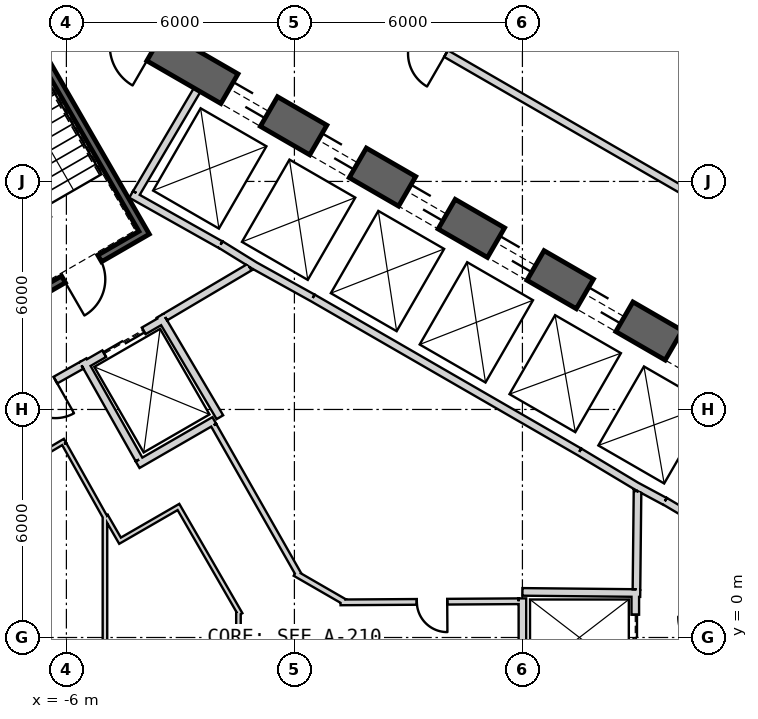
"""IFC4 building model, lengths in metres.
Left out: names, types, materials, properties, quantities, classifications, styles, units other than length and angle.
Written with IfcOpenShell. Run it as: python <this file> out.ifc"""

import sys

from ifc_helpers import new_model, si_unit, direction, frame, frame_2d, origin, place, context, subcontext, project, spatial, rectangle, extrude, element, fill, save


model = new_model("IFC4")
c1 = context("Model", 3, precision=1e-05, world=origin(), true_north=direction((0.0, 1.0)))
c2 = subcontext(c1, "Body", "Model", "MODEL_VIEW")
j1 = project(units=[si_unit("LENGTHUNIT", "METRE"), si_unit("PLANEANGLEUNIT", "RADIAN")], contexts=[c1])
p1 = place(None, origin())
s1 = spatial("IfcSite", under=j1, at=p1, CompositionType="ELEMENT")
p2 = place(p1, origin())
s2 = spatial("IfcBuilding", under=s1, at=p2, CompositionType="ELEMENT")
p3 = place(p2, frame((0.0, 0.0, 45.5)))
s3 = spatial("IfcBuildingStorey", under=s2, at=p3, CompositionType="ELEMENT", Elevation=45.5)
p4 = place(p3, frame((19.475, 2.208, 0.0), z_axis=(0.0, 0.0, 1.0), x_axis=(-0.866028369851, 0.499994862586, 0.0)))
e1 = element("IfcWall", 1, at=p4, inside=s3, PredefinedType="SHEAR", context=c2, shape_type="SweptSolid", body=[
    extrude(rectangle(XDim=31.523, YDim=0.9, at=frame_2d((15.762, 0.0))), origin(), (0.0, 0.0, 1.0), 4.1),
])
p5 = place(p4, frame((7.062, 0.0, 0.0)))
e2 = element("IfcOpeningElement", 2, at=p5, cuts=e1, PredefinedType="OPENING", context=c2, shape_type="SweptSolid", body=[
    extrude(rectangle(XDim=1.2, YDim=2.4, at=frame_2d((0.6, 1.2))), frame((0.0, 0.46, 0.0), z_axis=(0.0, -1.0, 0.0), x_axis=(1.0, 0.0, 0.0)), (0.0, 0.0, 1.0), 0.92),
])
p6 = place(p4, frame((9.762, 0.0, 0.0)))
e3 = element("IfcOpeningElement", 3, at=p6, cuts=e1, PredefinedType="OPENING", context=c2, shape_type="SweptSolid", body=[
    extrude(rectangle(XDim=1.2, YDim=2.4, at=frame_2d((0.6, 1.2))), frame((0.0, 0.46, 0.0), z_axis=(0.0, -1.0, 0.0), x_axis=(1.0, 0.0, 0.0)), (0.0, 0.0, 1.0), 0.92),
])
p7 = place(p4, frame((12.462, 0.0, 0.0)))
e4 = element("IfcOpeningElement", 4, at=p7, cuts=e1, PredefinedType="OPENING", context=c2, shape_type="SweptSolid", body=[
    extrude(rectangle(XDim=1.2, YDim=2.4, at=frame_2d((0.6, 1.2))), frame((0.0, 0.46, 0.0), z_axis=(0.0, -1.0, 0.0), x_axis=(1.0, 0.0, 0.0)), (0.0, 0.0, 1.0), 0.92),
])
p8 = place(p4, frame((15.162, 0.0, 0.0)))
e5 = element("IfcOpeningElement", 5, at=p8, cuts=e1, PredefinedType="OPENING", context=c2, shape_type="SweptSolid", body=[
    extrude(rectangle(XDim=1.2, YDim=2.4, at=frame_2d((0.6, 1.2))), frame((0.0, 0.46, 0.0), z_axis=(0.0, -1.0, 0.0), x_axis=(1.0, 0.0, 0.0)), (0.0, 0.0, 1.0), 0.92),
])
p9 = place(p4, frame((17.862, 0.0, 0.0)))
e6 = element("IfcOpeningElement", 6, at=p9, cuts=e1, PredefinedType="OPENING", context=c2, shape_type="SweptSolid", body=[
    extrude(rectangle(XDim=1.2, YDim=2.4, at=frame_2d((0.6, 1.2))), frame((0.0, 0.46, 0.0), z_axis=(0.0, -1.0, 0.0), x_axis=(1.0, 0.0, 0.0)), (0.0, 0.0, 1.0), 0.92),
])
p10 = place(p4, frame((20.562, 0.0, 0.0)))
e7 = element("IfcOpeningElement", 7, at=p10, cuts=e1, PredefinedType="OPENING", context=c2, shape_type="SweptSolid", body=[
    extrude(rectangle(XDim=1.2, YDim=2.4, at=frame_2d((0.6, 1.2))), frame((0.0, 0.46, 0.0), z_axis=(0.0, -1.0, 0.0), x_axis=(1.0, 0.0, 0.0)), (0.0, 0.0, 1.0), 0.92),
])
p11 = place(p4, frame((23.262, 0.0, 0.0)))
e8 = element("IfcOpeningElement", 8, at=p11, cuts=e1, PredefinedType="OPENING", context=c2, shape_type="SweptSolid", body=[
    extrude(rectangle(XDim=1.2, YDim=2.4, at=frame_2d((0.6, 1.2))), frame((0.0, 0.46, 0.0), z_axis=(0.0, -1.0, 0.0), x_axis=(1.0, 0.0, 0.0)), (0.0, 0.0, 1.0), 0.92),
])
p12 = place(p4, frame((3.612, 0.0, 0.0)))
e9 = element("IfcOpeningElement", 9, at=p12, cuts=e1, PredefinedType="OPENING", context=c2, shape_type="SweptSolid", body=[
    extrude(rectangle(XDim=1.2, YDim=2.4, at=frame_2d((0.6, 1.2))), frame((0.0, 0.46, 0.0), z_axis=(0.0, -1.0, 0.0), x_axis=(1.0, 0.0, 0.0)), (0.0, 0.0, 1.0), 0.92),
])
p13 = place(p4, frame((26.712, 0.0, 0.0)))
e10 = element("IfcOpeningElement", 10, at=p13, cuts=e1, PredefinedType="OPENING", context=c2, shape_type="SweptSolid", body=[
    extrude(rectangle(XDim=1.2, YDim=2.4, at=frame_2d((0.6, 1.2))), frame((0.0, 0.46, 0.0), z_axis=(0.0, -1.0, 0.0), x_axis=(1.0, 0.0, 0.0)), (0.0, 0.0, 1.0), 0.92),
])
p14 = place(p3, frame((7.497, 4.886, 0.0), z_axis=(0.0, 0.0, 1.0), x_axis=(-0.866030989016, 0.499990325971, 0.0)))
e11 = element("IfcWall", 11, at=p14, inside=s3, PredefinedType="PLUMBINGWALL", context=c2, shape_type="SweptSolid", body=[
    extrude(rectangle(XDim=8.1, YDim=0.2, at=frame_2d((4.05, 0.0))), origin(), (0.0, 0.0, 1.0), 3.8),
])
p15 = place(p3, frame((12.073, 2.211, 0.0), z_axis=(0.0, 0.0, 1.0), x_axis=(-0.860438357912, 0.509554542943, 0.0)))
e12 = element("IfcWall", 12, at=p15, inside=s3, PredefinedType="PLUMBINGWALL", context=c2, shape_type="SweptSolid", body=[
    extrude(rectangle(XDim=2.7, YDim=0.2, at=frame_2d((1.35, 0.0))), origin(), (0.0, 0.0, 1.0), 3.8),
])
p16 = place(p3, frame((9.748, 3.583, 0.0), z_axis=(0.0, 0.0, 1.0), x_axis=(-0.880917147855, 0.473270513147, 0.0)))
e13 = element("IfcWall", 13, at=p16, inside=s3, PredefinedType="PLUMBINGWALL", context=c2, shape_type="SweptSolid", body=[
    extrude(rectangle(XDim=0.878, YDim=0.2, at=frame_2d((0.439, 0.0))), origin(), (0.0, 0.0, 1.0), 3.8),
])
p17 = place(p3, frame((9.079, 3.937, 0.0), z_axis=(0.0, 0.0, 1.0), x_axis=(-0.857516281273, 0.51445682749, 0.0)))
e14 = element("IfcWall", 14, at=p17, inside=s3, PredefinedType="PLUMBINGWALL", context=c2, shape_type="SweptSolid", body=[
    extrude(rectangle(XDim=1.845, YDim=0.2, at=frame_2d((0.922, 0.0))), origin(), (0.0, 0.0, 1.0), 3.8),
])
p18 = place(p3, frame((-1.941, 10.339, 0.0), z_axis=(0.0, 0.0, 1.0), x_axis=(0.850216889117, -0.526432561171, 0.0)))
e15 = element("IfcWall", 15, at=p18, inside=s3, PredefinedType="PLUMBINGWALL", context=c2, shape_type="SweptSolid", body=[
    extrude(rectangle(XDim=1.078, YDim=0.2, at=frame_2d((0.539, 0.0))), origin(), (0.0, 0.0, 1.0), 3.8),
])
p19 = place(p3, frame((0.483, 8.936, 0.0), z_axis=(0.0, 0.0, 1.0), x_axis=(-0.874269620932, 0.485440655401, 0.0)))
e16 = element("IfcWall", 16, at=p19, inside=s3, PredefinedType="PLUMBINGWALL", context=c2, shape_type="SweptSolid", body=[
    extrude(rectangle(XDim=1.845, YDim=0.2, at=frame_2d((0.922, 0.0))), origin(), (0.0, 0.0, 1.0), 3.8),
])
p20 = place(p3, frame((-4.296, 11.659, 0.0), z_axis=(0.0, 0.0, 1.0), x_axis=(0.871534483978, -0.490334215854, 0.0)))
e17 = element("IfcWall", 17, at=p20, inside=s3, PredefinedType="PLUMBINGWALL", context=c2, shape_type="SweptSolid", body=[
    extrude(rectangle(XDim=2.7, YDim=0.2, at=frame_2d((1.35, 0.0))), origin(), (0.0, 0.0, 1.0), 3.8),
])
p21 = place(p3, frame((-4.158, 11.696, 0.0), z_axis=(0.0, 0.0, 1.0), x_axis=(0.508018930956, 0.861345903683, 0.0)))
e18 = element("IfcWall", 18, at=p21, inside=s3, PredefinedType="PLUMBINGWALL", context=c2, shape_type="SweptSolid", body=[
    extrude(rectangle(XDim=3.15, YDim=0.2, at=frame_2d((1.575, 0.0))), origin(), (0.0, 0.0, 1.0), 3.8),
])
p22 = place(p3, frame((8.97, 1.2, 0.0), z_axis=(0.0, 0.0, 1.0), x_axis=(0.0, -1.0, 0.0)))
e19 = element("IfcWall", 19, at=p22, inside=s3, PredefinedType="PLUMBINGWALL", context=c2, shape_type="SweptSolid", body=[
    extrude(rectangle(XDim=2.4, YDim=0.2, at=frame_2d((1.2, 0.0))), origin(), (0.0, 0.0, 1.0), 3.8),
])
p23 = place(p22, frame((0.6, 0.0, 0.0)))
e20 = element("IfcOpeningElement", 20, at=p23, cuts=e19, PredefinedType="OPENING", context=c2, shape_type="SweptSolid", body=[
    extrude(rectangle(XDim=1.2, YDim=2.4, at=frame_2d((0.6, 1.2))), frame((0.0, 0.11, 0.0), z_axis=(0.0, -1.0, 0.0), x_axis=(1.0, 0.0, 0.0)), (0.0, 0.0, 1.0), 0.22),
])
p24 = place(p3, frame((6.0, 1.2, 0.0), z_axis=(0.0, 0.0, 1.0), x_axis=(0.999949988, -0.010001074852, 0.0)))
e21 = element("IfcWall", 21, at=p24, inside=s3, PredefinedType="PLUMBINGWALL", context=c2, shape_type="SweptSolid", body=[
    extrude(rectangle(XDim=3.1, YDim=0.2, at=frame_2d((1.55, 0.0))), origin(), (0.0, 0.0, 1.0), 3.8),
])
p25 = place(p3, frame((6.0, -1.1, 0.0), z_axis=(0.0, 0.0, 1.0), x_axis=(0.0, 1.0, 0.0)))
e22 = element("IfcWall", 22, at=p25, inside=s3, PredefinedType="PLUMBINGWALL", context=c2, shape_type="SweptSolid", body=[
    extrude(rectangle(XDim=2.13, YDim=0.2, at=frame_2d((1.065, 0.0))), origin(), (0.0, 0.0, 1.0), 3.8),
])
p26 = place(p3, frame((-7.854, 17.405, -0.3), z_axis=(0.0, 0.0, 1.0), x_axis=(0.499997992926, -0.866026562566, 0.0)))
e23 = element("IfcWall", 23, at=p26, inside=s3, PredefinedType="SHEAR", context=c2, shape_type="SweptSolid", body=[
    extrude(rectangle(XDim=7.9, YDim=0.2, at=frame_2d((3.95, 0.0))), origin(), (0.0, 0.0, 1.0), 4.1),
])
p27 = place(p3, frame((-7.159, 8.8, -0.3), z_axis=(0.0, 0.0, 1.0), x_axis=(0.866047807691, 0.499961193289, 0.0)))
e24 = element("IfcWall", 24, at=p27, inside=s3, PredefinedType="SHEAR", context=c2, shape_type="SweptSolid", body=[
    extrude(rectangle(XDim=3.6, YDim=0.2, at=frame_2d((1.8, 0.0))), origin(), (0.0, 0.0, 1.0), 4.1),
])
p28 = place(p27, frame((1.25, 0.0, 0.3)))
e25 = element("IfcOpeningElement", 25, at=p28, cuts=e24, PredefinedType="OPENING", context=c2, shape_type="SweptSolid", body=[
    extrude(rectangle(XDim=1.1, YDim=2.1, at=frame_2d((0.55, 1.05))), frame((0.0, 0.11, 0.0), z_axis=(0.0, -1.0, 0.0), x_axis=(1.0, 0.0, 0.0)), (0.0, 0.0, 1.0), 0.22),
])
p29 = place(p3, frame((-5.524, 7.168, 0.0), z_axis=(0.0, 0.0, 1.0), x_axis=(0.866024647952, 0.500001309137, 0.0)))
e26 = element("IfcWall", 26, at=p29, inside=s3, PredefinedType="PLUMBINGWALL", context=c2, shape_type="SweptSolid", body=[
    extrude(rectangle(XDim=2.4, YDim=0.2, at=frame_2d((1.2, 0.0))), origin(), (0.0, 0.0, 1.0), 3.8),
])
p30 = place(p29, frame((0.6, 0.0, 0.0)))
e27 = element("IfcOpeningElement", 27, at=p30, cuts=e26, PredefinedType="OPENING", context=c2, shape_type="SweptSolid", body=[
    extrude(rectangle(XDim=1.2, YDim=2.4, at=frame_2d((0.6, 1.2))), frame((0.0, 0.11, 0.0), z_axis=(0.0, -1.0, 0.0), x_axis=(1.0, 0.0, 0.0)), (0.0, 0.0, 1.0), 0.22),
])
p31 = place(p3, frame((-3.538, 8.465, 0.0), z_axis=(0.0, 0.0, 1.0), x_axis=(0.508647062354, -0.860975125052, 0.0)))
e28 = element("IfcWall", 28, at=p31, inside=s3, PredefinedType="PLUMBINGWALL", context=c2, shape_type="SweptSolid", body=[
    extrude(rectangle(XDim=3.1, YDim=0.2, at=frame_2d((1.55, 0.0))), origin(), (0.0, 0.0, 1.0), 3.8),
])
p32 = place(p3, frame((-2.108, 5.711, 0.0), z_axis=(0.0, 0.0, 1.0), x_axis=(-0.866009305107, -0.50002788269, 0.0)))
e29 = element("IfcWall", 29, at=p32, inside=s3, PredefinedType="PLUMBINGWALL", context=c2, shape_type="SweptSolid", body=[
    extrude(rectangle(XDim=2.329, YDim=0.2, at=frame_2d((1.165, 0.0))), origin(), (0.0, 0.0, 1.0), 3.8),
])
p33 = place(p3, frame((-5.562, 7.296, 0.0), z_axis=(0.0, 0.0, 1.0), x_axis=(0.49134651263, -0.870964180966, 0.0)))
e30 = element("IfcWall", 30, at=p33, inside=s3, PredefinedType="PLUMBINGWALL", context=c2, shape_type="SweptSolid", body=[
    extrude(rectangle(XDim=3.0, YDim=0.2, at=frame_2d((1.5, 0.0))), origin(), (0.0, 0.0, 1.0), 3.8),
])
p34 = place(p3, frame((9.001, 1.27, 0.0), z_axis=(0.0, 0.0, 1.0), x_axis=(0.010784614026, 0.999941844359, 0.0)))
e31 = element("IfcWall", 31, at=p34, inside=s3, PredefinedType="PARTITIONING", context=c2, shape_type="SweptSolid", body=[
    extrude(rectangle(XDim=2.581, YDim=0.2, at=frame_2d((1.291, 0.0))), origin(), (0.0, 0.0, 1.0), 3.8),
])
p35 = place(p3, frame((-1.18, 9.744, 0.0), z_axis=(0.0, 0.0, 1.0), x_axis=(-0.860615607571, -0.509255118781, 0.0)))
e32 = element("IfcWall", 32, at=p35, inside=s3, PredefinedType="PARTITIONING", context=c2, shape_type="SweptSolid", body=[
    extrude(rectangle(XDim=2.581, YDim=0.2, at=frame_2d((1.29, 0.0))), origin(), (0.0, 0.0, 1.0), 3.8),
])
p36 = place(p3, frame((-5.6, 7.16, 0.0), z_axis=(0.0, 0.0, 1.0), x_axis=(-0.871363259478, -0.490638431059, 0.0)))
e33 = element("IfcWall", 33, at=p36, inside=s3, PredefinedType="PARTITIONING", context=c2, shape_type="SweptSolid", body=[
    extrude(rectangle(XDim=2.581, YDim=0.2, at=frame_2d((1.291, 0.0))), origin(), (0.0, 0.0, 1.0), 3.8),
])
p37 = place(p36, frame((0.791, 0.0, 0.0)))
e34 = element("IfcOpeningElement", 34, at=p37, cuts=e33, PredefinedType="OPENING", context=c2, shape_type="SweptSolid", body=[
    extrude(rectangle(XDim=1.0, YDim=2.1, at=frame_2d((0.5, 1.05))), frame((0.0, 0.11, 0.0), z_axis=(0.0, -1.0, 0.0), x_axis=(1.0, 0.0, 0.0)), (0.0, 0.0, 1.0), 0.22),
])
p38 = place(p3, frame((1.214, 0.924, 0.0), z_axis=(0.0, 0.0, 1.0), x_axis=(0.999979796062, 0.006356686907, 0.0)))
e35 = element("IfcWall", 35, at=p38, inside=s3, PredefinedType="PLUMBINGWALL", context=c2, shape_type="SweptSolid", body=[
    extrude(rectangle(XDim=4.686, YDim=0.15, at=frame_2d((2.343, 0.0))), origin(), (0.0, 0.0, 1.0), 3.8),
])
p39 = place(p38, frame((2.007, 0.0, 0.0)))
e36 = element("IfcOpeningElement", 36, at=p39, cuts=e35, PredefinedType="OPENING", context=c2, shape_type="SweptSolid", body=[
    extrude(rectangle(XDim=0.8, YDim=2.1, at=frame_2d((0.4, 1.05))), frame((0.0, 0.085, 0.0), z_axis=(0.0, -1.0, 0.0), x_axis=(1.0, 0.0, 0.0)), (0.0, 0.0, 1.0), 0.17),
])
p40 = place(p3, frame((0.019, 1.689, 0.0), z_axis=(0.0, 0.0, 1.0), x_axis=(0.866047774678, -0.499961250474, 0.0)))
e37 = element("IfcWall", 37, at=p40, inside=s3, PredefinedType="PLUMBINGWALL", context=c2, shape_type="SweptSolid", body=[
    extrude(rectangle(XDim=1.504, YDim=0.15, at=frame_2d((0.752, 0.0))), origin(), (0.0, 0.0, 1.0), 3.8),
])
p41 = place(p3, frame((-2.124, 5.586, 0.0), z_axis=(0.0, 0.0, 1.0), x_axis=(0.494514430604, -0.869169418424, 0.0)))
e38 = element("IfcWall", 38, at=p41, inside=s3, PredefinedType="PLUMBINGWALL", context=c2, shape_type="SweptSolid", body=[
    extrude(rectangle(XDim=4.534, YDim=0.15, at=frame_2d((2.267, 0.0))), origin(), (0.0, 0.0, 1.0), 3.8),
])
p42 = place(p3, frame((-4.985, -3.235, 0.0), z_axis=(0.0, 0.0, 1.0), x_axis=(0.0, 1.0, 0.0)))
e39 = element("IfcWall", 39, at=p42, inside=s3, PredefinedType="PARTITIONING", context=c2, shape_type="SweptSolid", body=[
    extrude(rectangle(XDim=6.469, YDim=0.12, at=frame_2d((3.235, 0.0))), origin(), (0.0, 0.0, 1.0), 3.8),
])
p43 = place(p3, frame((-6.037, 5.176, 0.0), z_axis=(0.0, 0.0, 1.0), x_axis=(-0.860106072674, -0.510115225953, 0.0)))
e40 = element("IfcWall", 40, at=p43, inside=s3, PredefinedType="PARTITIONING", context=c2, shape_type="SweptSolid", body=[
    extrude(rectangle(XDim=2.225, YDim=0.12, at=frame_2d((1.112, 0.0))), origin(), (0.0, 0.0, 1.0), 3.8),
])
p44 = place(p3, frame((-4.983, 3.172, 0.0), z_axis=(0.0, 0.0, 1.0), x_axis=(-0.488728310113, 0.872436037136, 0.0)))
e41 = element("IfcWall", 41, at=p44, inside=s3, PredefinedType="PARTITIONING", context=c2, shape_type="SweptSolid", body=[
    extrude(rectangle(XDim=2.201, YDim=0.12, at=frame_2d((1.101, 0.0))), origin(), (0.0, 0.0, 1.0), 3.8),
])
p45 = place(p3, frame((-4.558, 2.495, 0.0), z_axis=(0.0, 0.0, 1.0), x_axis=(-0.499757756434, 0.866165218006, 0.0)))
e42 = element("IfcWall", 42, at=p45, inside=s3, PredefinedType="PARTITIONING", context=c2, shape_type="SweptSolid", body=[
    extrude(rectangle(XDim=0.798, YDim=0.12, at=frame_2d((0.399, 0.0))), origin(), (0.0, 0.0, 1.0), 3.8),
])
p46 = place(p3, frame((-2.999, 3.465, 0.0), z_axis=(0.0, 0.0, 1.0), x_axis=(-0.866059624469, -0.499940723351, 0.0)))
e43 = element("IfcWall", 43, at=p46, inside=s3, PredefinedType="PARTITIONING", context=c2, shape_type="SweptSolid", body=[
    extrude(rectangle(XDim=1.775, YDim=0.12, at=frame_2d((0.888, 0.0))), origin(), (0.0, 0.0, 1.0), 3.8),
])
p47 = place(p3, frame((-1.42, 0.61, 0.0), z_axis=(0.0, 0.0, 1.0), x_axis=(-0.500034908033, 0.866005248684, 0.0)))
e44 = element("IfcWall", 44, at=p47, inside=s3, PredefinedType="PARTITIONING", context=c2, shape_type="SweptSolid", body=[
    extrude(rectangle(XDim=3.201, YDim=0.12, at=frame_2d((1.601, 0.0))), origin(), (0.0, 0.0, 1.0), 3.8),
])
p48 = place(p3, frame((-1.472, -0.804, 0.0), z_axis=(0.0, 0.0, 1.0), x_axis=(0.0, 1.0, 0.0)))
e45 = element("IfcWall", 45, at=p48, inside=s3, PredefinedType="PARTITIONING", context=c2, shape_type="SweptSolid", body=[
    extrude(rectangle(XDim=1.485, YDim=0.12, at=frame_2d((0.743, 0.0))), origin(), (0.0, 0.0, 1.0), 3.8),
])
p49 = place(p3, frame((16.423, 8.185, 0.0), z_axis=(0.0, 0.0, 1.0), x_axis=(-0.866026561282, 0.49999799515, 0.0)))
e46 = element("IfcWall", 46, at=p49, inside=s3, PredefinedType="PARTITIONING", context=c2, shape_type="SweptSolid", body=[
    extrude(rectangle(XDim=26.435, YDim=0.2, at=frame_2d((13.218, 0.0))), origin(), (0.0, 0.0, 1.0), 2.98),
])
p50 = place(p49, frame((14.356, 0.0, 0.0)))
e47 = element("IfcOpeningElement", 47, at=p50, cuts=e46, PredefinedType="OPENING", context=c2, shape_type="SweptSolid", body=[
    extrude(rectangle(XDim=1.0, YDim=2.1, at=frame_2d((0.5, 1.05))), frame((0.0, 0.11, 0.0), z_axis=(0.0, -1.0, 0.0), x_axis=(1.0, 0.0, 0.0)), (0.0, 0.0, 1.0), 0.22),
])
p51 = place(p49, frame((1.139, 0.0, 0.0)))
e48 = element("IfcOpeningElement", 48, at=p51, cuts=e46, PredefinedType="OPENING", context=c2, shape_type="SweptSolid", body=[
    extrude(rectangle(XDim=1.0, YDim=2.1, at=frame_2d((0.5, 1.05))), frame((0.0, 0.11, 0.0), z_axis=(0.0, -1.0, 0.0), x_axis=(1.0, 0.0, 0.0)), (0.0, 0.0, 1.0), 0.22),
])
p52 = place(p23, origin())
e49 = element("IfcDoor", 49, at=p52, inside=s3, OperationType="SLIDING_TO_LEFT", PredefinedType="USERDEFINED", context=c2, shape_type="SweptSolid", body=[
    extrude(rectangle(XDim=1.2, YDim=2.4, at=frame_2d((0.6, 1.2))), frame((0.0, 0.025, 0.0), z_axis=(0.0, -1.0, 0.0), x_axis=(1.0, 0.0, 0.0)), (0.0, 0.0, 1.0), 0.05),
])
fill(e20, e49)
p53 = place(p28, origin())
e50 = element("IfcDoor", 50, at=p53, inside=s3, OperationType="SINGLE_SWING_LEFT", PredefinedType="USERDEFINED", context=c2, shape_type="SweptSolid", body=[
    extrude(rectangle(XDim=1.1, YDim=2.1, at=frame_2d((0.55, 1.05))), frame((0.0, 0.025, 0.0), z_axis=(0.0, -1.0, 0.0), x_axis=(1.0, 0.0, 0.0)), (0.0, 0.0, 1.0), 0.05),
])
fill(e25, e50)
p54 = place(p37, origin())
e51 = element("IfcDoor", 51, at=p54, inside=s3, OperationType="SINGLE_SWING_RIGHT", PredefinedType="USERDEFINED", context=c2, shape_type="SweptSolid", body=[
    extrude(rectangle(XDim=1.0, YDim=2.1, at=frame_2d((0.5, 1.05))), frame((0.0, 0.025, 0.0), z_axis=(0.0, -1.0, 0.0), x_axis=(1.0, 0.0, 0.0)), (0.0, 0.0, 1.0), 0.05),
])
fill(e34, e51)
p55 = place(p30, origin())
e52 = element("IfcDoor", 52, at=p55, inside=s3, OperationType="SLIDING_TO_LEFT", PredefinedType="USERDEFINED", context=c2, shape_type="SweptSolid", body=[
    extrude(rectangle(XDim=1.2, YDim=2.4, at=frame_2d((0.6, 1.2))), frame((0.0, 0.025, 0.0), z_axis=(0.0, -1.0, 0.0), x_axis=(1.0, 0.0, 0.0)), (0.0, 0.0, 1.0), 0.05),
])
fill(e27, e52)
p56 = place(p39, origin())
e53 = element("IfcDoor", 53, at=p56, inside=s3, OperationType="SINGLE_SWING_LEFT", PredefinedType="USERDEFINED", context=c2, shape_type="SweptSolid", body=[
    extrude(rectangle(XDim=0.8, YDim=2.1, at=frame_2d((0.4, 1.05))), frame((0.0, 0.025, 0.0), z_axis=(0.0, -1.0, 0.0), x_axis=(1.0, 0.0, 0.0)), (0.0, 0.0, 1.0), 0.05),
])
fill(e36, e53)
p57 = place(p50, origin())
e54 = element("IfcDoor", 54, at=p57, inside=s3, OperationType="SINGLE_SWING_RIGHT", PredefinedType="USERDEFINED", context=c2, shape_type="SweptSolid", body=[
    extrude(rectangle(XDim=1.0, YDim=2.1, at=frame_2d((0.5, 1.05))), frame((0.0, 0.025, 0.0), z_axis=(0.0, -1.0, 0.0), x_axis=(1.0, 0.0, 0.0)), (0.0, 0.0, 1.0), 0.05),
])
fill(e47, e54)
p58 = place(p6, origin())
e55 = element("IfcDoor", 55, at=p58, inside=s3, OperationType="SLIDING_TO_LEFT", PredefinedType="USERDEFINED", context=c2, shape_type="SweptSolid", body=[
    extrude(rectangle(XDim=1.2, YDim=2.4, at=frame_2d((0.6, 1.2))), frame((0.0, 0.025, 0.0), z_axis=(0.0, -1.0, 0.0), x_axis=(1.0, 0.0, 0.0)), (0.0, 0.0, 1.0), 0.05),
])
fill(e3, e55)
p59 = place(p7, origin())
e56 = element("IfcDoor", 56, at=p59, inside=s3, OperationType="SLIDING_TO_LEFT", PredefinedType="USERDEFINED", context=c2, shape_type="SweptSolid", body=[
    extrude(rectangle(XDim=1.2, YDim=2.4, at=frame_2d((0.6, 1.2))), frame((0.0, 0.025, 0.0), z_axis=(0.0, -1.0, 0.0), x_axis=(1.0, 0.0, 0.0)), (0.0, 0.0, 1.0), 0.05),
])
fill(e4, e56)
p60 = place(p8, origin())
e57 = element("IfcDoor", 57, at=p60, inside=s3, OperationType="SLIDING_TO_LEFT", PredefinedType="USERDEFINED", context=c2, shape_type="SweptSolid", body=[
    extrude(rectangle(XDim=1.2, YDim=2.4, at=frame_2d((0.6, 1.2))), frame((0.0, 0.025, 0.0), z_axis=(0.0, -1.0, 0.0), x_axis=(1.0, 0.0, 0.0)), (0.0, 0.0, 1.0), 0.05),
])
fill(e5, e57)
p61 = place(p9, origin())
e58 = element("IfcDoor", 58, at=p61, inside=s3, OperationType="SLIDING_TO_LEFT", PredefinedType="USERDEFINED", context=c2, shape_type="SweptSolid", body=[
    extrude(rectangle(XDim=1.2, YDim=2.4, at=frame_2d((0.6, 1.2))), frame((0.0, 0.025, 0.0), z_axis=(0.0, -1.0, 0.0), x_axis=(1.0, 0.0, 0.0)), (0.0, 0.0, 1.0), 0.05),
])
fill(e6, e58)
p62 = place(p10, origin())
e59 = element("IfcDoor", 59, at=p62, inside=s3, OperationType="SLIDING_TO_LEFT", PredefinedType="USERDEFINED", context=c2, shape_type="SweptSolid", body=[
    extrude(rectangle(XDim=1.2, YDim=2.4, at=frame_2d((0.6, 1.2))), frame((0.0, 0.025, 0.0), z_axis=(0.0, -1.0, 0.0), x_axis=(1.0, 0.0, 0.0)), (0.0, 0.0, 1.0), 0.05),
])
fill(e7, e59)
p63 = place(p11, origin())
e60 = element("IfcDoor", 60, at=p63, inside=s3, OperationType="SLIDING_TO_LEFT", PredefinedType="USERDEFINED", context=c2, shape_type="SweptSolid", body=[
    extrude(rectangle(XDim=1.2, YDim=2.4, at=frame_2d((0.6, 1.2))), frame((0.0, 0.025, 0.0), z_axis=(0.0, -1.0, 0.0), x_axis=(1.0, 0.0, 0.0)), (0.0, 0.0, 1.0), 0.05),
])
fill(e8, e60)
save(model, sys.argv[1])
